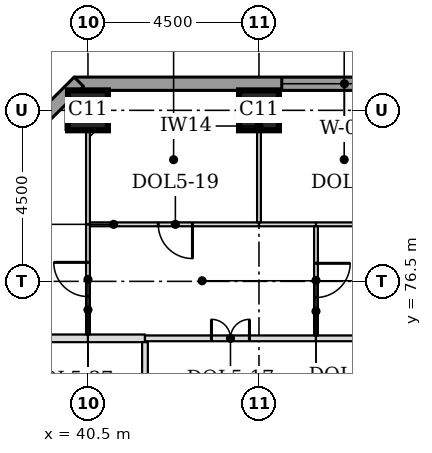
"""IFC4 building model, lengths in metres.
Left out: names, types, materials, properties, quantities, classifications, styles, units other than length and angle.
Written with IfcOpenShell. Run it as: python <this file> out.ifc"""

import sys

from ifc_helpers import new_model, si_unit, direction, frame, frame_2d, origin, origin_2d, place, context, subcontext, project, spatial, rectangle, extrude, element, fill, save


model = new_model("IFC4")
c1 = context("Model", 3, precision=1e-05, world=origin(), true_north=direction((0.0, 1.0)))
c2 = subcontext(c1, "Body", "Model", "MODEL_VIEW")
j1 = project(units=[si_unit("LENGTHUNIT", "METRE"), si_unit("PLANEANGLEUNIT", "RADIAN")], contexts=[c1])
p1 = place(None, origin())
s1 = spatial("IfcSite", under=j1, at=p1, CompositionType="ELEMENT")
p2 = place(p1, origin())
s2 = spatial("IfcBuilding", under=s1, at=p2, CompositionType="ELEMENT")
p3 = place(p2, frame((0.0, 0.0, 112.2)))
s3 = spatial("IfcBuildingStorey", under=s2, at=p3, CompositionType="ELEMENT", Elevation=112.2)
for number, where, z_axis, x_axis in (
    (1, (40.5, 81.0, 0.0), (0.0, 0.0, 1.0), (1.0, 0.0, 0.0)),
    (2, (45.0, 81.0, 0.0), (0.0, 0.0, 1.0), (1.0, 0.0, 0.0)),
):
    element("IfcColumn", number, at=place(p3, frame(where, z_axis=z_axis, x_axis=x_axis)), inside=s3, PredefinedType="COLUMN", context=c2, shape_type="SweptSolid", body=[
        extrude(rectangle(XDim=1.05, YDim=1.05, at=origin_2d()), origin(), (0.0, 0.0, 1.0), 3.7),
    ])
p4 = place(p3, frame((72.362, 81.7, 0.0), z_axis=(0.0, 0.0, 1.0), x_axis=(-1.0, 0.0, 0.0)))
e3 = element("IfcWall", 3, at=p4, inside=s3, PredefinedType="STANDARD", context=c2, shape_type="SweptSolid", body=[
    extrude(rectangle(XDim=32.225, YDim=0.35, at=frame_2d((16.112, 0.0))), origin(), (0.0, 0.0, 1.0), 3.525),
])
p5 = place(p4, frame((5.462, 0.0, 0.9)))
e4 = element("IfcOpeningElement", 4, at=p5, cuts=e3, PredefinedType="OPENING", context=c2, shape_type="SweptSolid", body=[
    extrude(rectangle(XDim=3.3, YDim=1.9, at=frame_2d((1.65, 0.95))), frame((0.0, 0.185, 0.0), z_axis=(0.0, -1.0, 0.0), x_axis=(1.0, 0.0, 0.0)), (0.0, 0.0, 1.0), 0.37),
])
p6 = place(p4, frame((9.962, 0.0, 0.9)))
e5 = element("IfcOpeningElement", 5, at=p6, cuts=e3, PredefinedType="OPENING", context=c2, shape_type="SweptSolid", body=[
    extrude(rectangle(XDim=3.3, YDim=1.9, at=frame_2d((1.65, 0.95))), frame((0.0, 0.185, 0.0), z_axis=(0.0, -1.0, 0.0), x_axis=(1.0, 0.0, 0.0)), (0.0, 0.0, 1.0), 0.37),
])
p7 = place(p4, frame((14.462, 0.0, 0.9)))
e6 = element("IfcOpeningElement", 6, at=p7, cuts=e3, PredefinedType="OPENING", context=c2, shape_type="SweptSolid", body=[
    extrude(rectangle(XDim=3.3, YDim=1.9, at=frame_2d((1.65, 0.95))), frame((0.0, 0.185, 0.0), z_axis=(0.0, -1.0, 0.0), x_axis=(1.0, 0.0, 0.0)), (0.0, 0.0, 1.0), 0.37),
])
p8 = place(p4, frame((18.962, 0.0, 0.9)))
e7 = element("IfcOpeningElement", 7, at=p8, cuts=e3, PredefinedType="OPENING", context=c2, shape_type="SweptSolid", body=[
    extrude(rectangle(XDim=3.3, YDim=1.9, at=frame_2d((1.65, 0.95))), frame((0.0, 0.185, 0.0), z_axis=(0.0, -1.0, 0.0), x_axis=(1.0, 0.0, 0.0)), (0.0, 0.0, 1.0), 0.37),
])
p9 = place(p4, frame((23.462, 0.0, 0.9)))
e8 = element("IfcOpeningElement", 8, at=p9, cuts=e3, PredefinedType="OPENING", context=c2, shape_type="SweptSolid", body=[
    extrude(rectangle(XDim=3.3, YDim=1.9, at=frame_2d((1.65, 0.95))), frame((0.0, 0.185, 0.0), z_axis=(0.0, -1.0, 0.0), x_axis=(1.0, 0.0, 0.0)), (0.0, 0.0, 1.0), 0.37),
])
p10 = place(p3, frame((40.261, 81.751, 0.0), z_axis=(0.0, 0.0, 1.0), x_axis=(-0.707106781187, -0.707106781187, 0.0)))
e9 = element("IfcWall", 9, at=p10, inside=s3, PredefinedType="STANDARD", context=c2, shape_type="SweptSolid", body=[
    extrude(rectangle(XDim=7.089, YDim=0.35, at=frame_2d((3.544, 0.0))), origin(), (0.0, 0.0, 1.0), 3.525),
])
p11 = place(p10, frame((1.894, 0.0, 0.9)))
e10 = element("IfcOpeningElement", 10, at=p11, cuts=e9, PredefinedType="OPENING", context=c2, shape_type="SweptSolid", body=[
    extrude(rectangle(XDim=3.3, YDim=1.9, at=frame_2d((1.65, 0.95))), frame((0.0, 0.185, 0.0), z_axis=(0.0, -1.0, 0.0), x_axis=(1.0, 0.0, 0.0)), (0.0, 0.0, 1.0), 0.37),
])
p12 = place(p3, frame((35.475, 75.0, 0.0), z_axis=(0.0, 0.0, 1.0), x_axis=(1.0, 0.0, 0.0)))
e11 = element("IfcWall", 11, at=p12, inside=s3, PredefinedType="PARTITIONING", context=c2, shape_type="SweptSolid", body=[
    extrude(rectangle(XDim=5.025, YDim=0.2, at=frame_2d((2.512, 0.0))), origin(), (0.0, 0.0, 1.0), 3.55),
])
p13 = place(p3, frame((40.5, 75.0, 0.0), z_axis=(0.0, 0.0, 1.0), x_axis=(1.0, 0.0, 0.0)))
e12 = element("IfcWall", 12, at=p13, inside=s3, PredefinedType="PARTITIONING", context=c2, shape_type="SweptSolid", body=[
    extrude(rectangle(XDim=1.5, YDim=0.2, at=frame_2d((0.75, 0.0))), origin(), (0.0, 0.0, 1.0), 3.55),
])
p14 = place(p3, frame((42.0, 75.0, 0.0), z_axis=(0.0, 0.0, 1.0), x_axis=(1.0, 0.0, 0.0)))
e13 = element("IfcWall", 13, at=p14, inside=s3, PredefinedType="PARTITIONING", context=c2, shape_type="SweptSolid", body=[
    extrude(rectangle(XDim=4.5, YDim=0.15, at=frame_2d((2.25, 0.0))), origin(), (0.0, 0.0, 1.0), 3.55),
])
p15 = place(p14, frame((1.75, 0.0, 0.0)))
e14 = element("IfcOpeningElement", 14, at=p15, cuts=e13, PredefinedType="OPENING", context=c2, shape_type="SweptSolid", body=[
    extrude(rectangle(XDim=1.0, YDim=2.1, at=frame_2d((0.5, 1.05))), frame((0.0, 0.085, 0.0), z_axis=(0.0, -1.0, 0.0), x_axis=(1.0, 0.0, 0.0)), (0.0, 0.0, 1.0), 0.17),
])
p16 = place(p3, frame((46.5, 75.0, 0.0), z_axis=(0.0, 0.0, 1.0), x_axis=(1.0, 0.0, 0.0)))
e15 = element("IfcWall", 15, at=p16, inside=s3, PredefinedType="PARTITIONING", context=c2, shape_type="SweptSolid", body=[
    extrude(rectangle(XDim=13.5, YDim=0.15, at=frame_2d((6.75, 0.0))), origin(), (0.0, 0.0, 1.0), 3.55),
])
p17 = place(p3, frame((40.55, 78.0, 0.0), z_axis=(0.0, 0.0, 1.0), x_axis=(1.0, 0.0, 0.0)))
e16 = element("IfcWall", 16, at=p17, inside=s3, PredefinedType="PARTITIONING", context=c2, shape_type="SweptSolid", body=[
    extrude(rectangle(XDim=4.45, YDim=0.1, at=frame_2d((2.225, 0.0))), origin(), (0.0, 0.0, 1.0), 3.55),
])
p18 = place(p17, frame((1.8, 0.0, 0.0)))
e17 = element("IfcOpeningElement", 17, at=p18, cuts=e16, PredefinedType="OPENING", context=c2, shape_type="SweptSolid", body=[
    extrude(rectangle(XDim=0.9, YDim=2.1, at=frame_2d((0.45, 1.05))), frame((0.0, 0.06, 0.0), z_axis=(0.0, -1.0, 0.0), x_axis=(1.0, 0.0, 0.0)), (0.0, 0.0, 1.0), 0.12),
])
p19 = place(p3, frame((45.0, 78.0, 0.0), z_axis=(0.0, 0.0, 1.0), x_axis=(1.0, 0.0, 0.0)))
e18 = element("IfcWall", 18, at=p19, inside=s3, PredefinedType="PARTITIONING", context=c2, shape_type="SweptSolid", body=[
    extrude(rectangle(XDim=1.5, YDim=0.1, at=frame_2d((0.75, 0.0))), origin(), (0.0, 0.0, 1.0), 3.55),
])
p20 = place(p3, frame((46.5, 78.0, 0.0), z_axis=(0.0, 0.0, 1.0), x_axis=(1.0, 0.0, 0.0)))
e19 = element("IfcWall", 19, at=p20, inside=s3, PredefinedType="PARTITIONING", context=c2, shape_type="SweptSolid", body=[
    extrude(rectangle(XDim=3.0, YDim=0.1, at=frame_2d((1.5, 0.0))), origin(), (0.0, 0.0, 1.0), 3.55),
])
p21 = place(p20, frame((1.05, 0.0, 0.0)))
e20 = element("IfcOpeningElement", 20, at=p21, cuts=e19, PredefinedType="OPENING", context=c2, shape_type="SweptSolid", body=[
    extrude(rectangle(XDim=0.9, YDim=2.1, at=frame_2d((0.45, 1.05))), frame((0.0, 0.06, 0.0), z_axis=(0.0, -1.0, 0.0), x_axis=(1.0, 0.0, 0.0)), (0.0, 0.0, 1.0), 0.12),
])
p22 = place(p3, frame((42.0, 57.075, 0.0), z_axis=(0.0, 0.0, 1.0), x_axis=(0.0, 1.0, 0.0)))
e21 = element("IfcWall", 21, at=p22, inside=s3, PredefinedType="PARTITIONING", context=c2, shape_type="SweptSolid", body=[
    extrude(rectangle(XDim=17.825, YDim=0.15, at=frame_2d((8.913, 0.0))), origin(), (0.0, 0.0, 1.0), 3.55),
])
p23 = place(p3, frame((46.5, 75.075, 0.0), z_axis=(0.0, 0.0, 1.0), x_axis=(0.0, 1.0, 0.0)))
e22 = element("IfcWall", 22, at=p23, inside=s3, PredefinedType="PARTITIONING", context=c2, shape_type="SweptSolid", body=[
    extrude(rectangle(XDim=2.875, YDim=0.1, at=frame_2d((1.438, 0.0))), origin(), (0.0, 0.0, 1.0), 3.022),
])
p24 = place(p23, frame((1.0, 0.0, 0.0)))
e23 = element("IfcOpeningElement", 23, at=p24, cuts=e22, PredefinedType="OPENING", context=c2, shape_type="SweptSolid", body=[
    extrude(rectangle(XDim=0.9, YDim=2.1, at=frame_2d((0.45, 1.05))), frame((0.0, 0.06, 0.0), z_axis=(0.0, -1.0, 0.0), x_axis=(1.0, 0.0, 0.0)), (0.0, 0.0, 1.0), 0.12),
])
p25 = place(p3, frame((40.5, 75.1, 0.0), z_axis=(0.0, 0.0, 1.0), x_axis=(0.0, 1.0, 0.0)))
e24 = element("IfcWall", 24, at=p25, inside=s3, PredefinedType="PARTITIONING", context=c2, shape_type="SweptSolid", body=[
    extrude(rectangle(XDim=2.9, YDim=0.1, at=frame_2d((1.45, 0.0))), origin(), (0.0, 0.0, 1.0), 3.55),
])
p26 = place(p25, frame((1.0, 0.0, 0.0)))
e25 = element("IfcOpeningElement", 25, at=p26, cuts=e24, PredefinedType="OPENING", context=c2, shape_type="SweptSolid", body=[
    extrude(rectangle(XDim=0.9, YDim=2.1, at=frame_2d((0.45, 1.05))), frame((0.0, 0.06, 0.0), z_axis=(0.0, -1.0, 0.0), x_axis=(1.0, 0.0, 0.0)), (0.0, 0.0, 1.0), 0.12),
])
p27 = place(p3, frame((40.5, 78.0, 0.0), z_axis=(0.0, 0.0, 1.0), x_axis=(0.0, 1.0, 0.0)))
e26 = element("IfcWall", 26, at=p27, inside=s3, PredefinedType="PARTITIONING", context=c2, shape_type="SweptSolid", body=[
    extrude(rectangle(XDim=2.475, YDim=0.1, at=frame_2d((1.238, 0.0))), origin(), (0.0, 0.0, 1.0), 3.55),
])
p28 = place(p3, frame((45.0, 78.05, 0.0), z_axis=(0.0, 0.0, 1.0), x_axis=(0.0, 1.0, 0.0)))
e27 = element("IfcWall", 27, at=p28, inside=s3, PredefinedType="PARTITIONING", context=c2, shape_type="SweptSolid", body=[
    extrude(rectangle(XDim=3.475, YDim=0.1, at=frame_2d((1.737, 0.0))), origin(), (0.0, 0.0, 1.0), 3.55),
])
p29 = place(p9, origin())
e28 = element("IfcWindow", 28, at=p29, inside=s3, PartitioningType="SINGLE_PANEL", PredefinedType="WINDOW", context=c2, shape_type="SweptSolid", body=[
    extrude(rectangle(XDim=3.3, YDim=1.9, at=frame_2d((1.65, 0.95))), frame((0.0, 0.085, 0.0), z_axis=(0.0, -1.0, 0.0), x_axis=(1.0, 0.0, 0.0)), (0.0, 0.0, 1.0), 0.06),
])
fill(e8, e28)
p30 = place(p15, origin())
e29 = element("IfcDoor", 29, at=p30, inside=s3, OperationType="DOUBLE_DOOR_SINGLE_SWING", PredefinedType="DOOR", context=c2, shape_type="SweptSolid", body=[
    extrude(rectangle(XDim=1.0, YDim=2.1, at=frame_2d((0.5, 1.05))), frame((0.0, 0.025, 0.0), z_axis=(0.0, -1.0, 0.0), x_axis=(1.0, 0.0, 0.0)), (0.0, 0.0, 1.0), 0.05),
])
fill(e14, e29)
p31 = place(p24, frame((0.9, 0.0, 0.0), z_axis=(0.0, 0.0, 1.0), x_axis=(-1.0, 0.0, 0.0)))
e30 = element("IfcDoor", 30, at=p31, inside=s3, OperationType="SINGLE_SWING_LEFT", PredefinedType="DOOR", context=c2, shape_type="SweptSolid", body=[
    extrude(rectangle(XDim=0.9, YDim=2.1, at=frame_2d((0.45, 1.05))), frame((0.0, 0.025, 0.0), z_axis=(0.0, -1.0, 0.0), x_axis=(1.0, 0.0, 0.0)), (0.0, 0.0, 1.0), 0.05),
])
fill(e23, e30)
p32 = place(p26, origin())
e31 = element("IfcDoor", 31, at=p32, inside=s3, OperationType="SINGLE_SWING_RIGHT", PredefinedType="DOOR", context=c2, shape_type="SweptSolid", body=[
    extrude(rectangle(XDim=0.9, YDim=2.1, at=frame_2d((0.45, 1.05))), frame((0.0, 0.025, 0.0), z_axis=(0.0, -1.0, 0.0), x_axis=(1.0, 0.0, 0.0)), (0.0, 0.0, 1.0), 0.05),
])
fill(e25, e31)
p33 = place(p18, frame((0.9, 0.0, 0.0), z_axis=(0.0, 0.0, 1.0), x_axis=(-1.0, 0.0, 0.0)))
e32 = element("IfcDoor", 32, at=p33, inside=s3, OperationType="SINGLE_SWING_LEFT", PredefinedType="DOOR", context=c2, shape_type="SweptSolid", body=[
    extrude(rectangle(XDim=0.9, YDim=2.1, at=frame_2d((0.45, 1.05))), frame((0.0, 0.025, 0.0), z_axis=(0.0, -1.0, 0.0), x_axis=(1.0, 0.0, 0.0)), (0.0, 0.0, 1.0), 0.05),
])
fill(e17, e32)
save(model, sys.argv[1])
